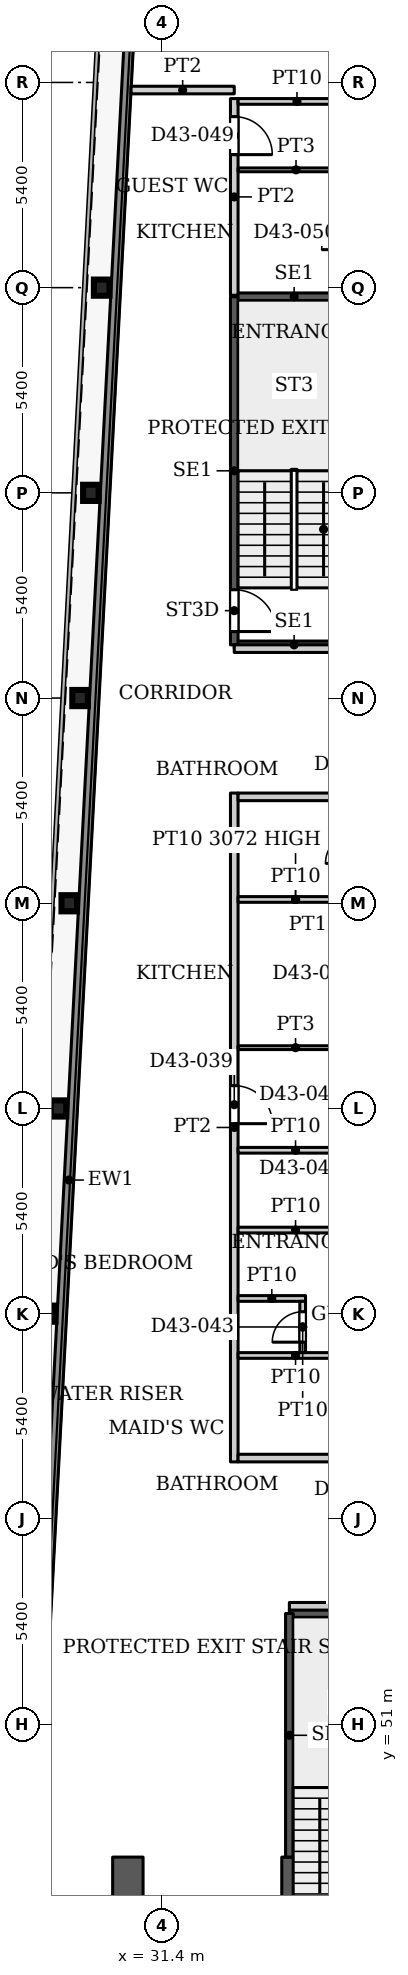
"""IFC4 building model, lengths in metres.
Left out: names, types, materials, properties, quantities, classifications, styles, units other than length and angle.
Written with IfcOpenShell. Run it as: python <this file> out.ifc"""

import sys

from ifc_helpers import new_model, si_unit, direction, frame, frame_2d, origin, origin_2d, place, context, subcontext, project, spatial, rectangle, i_section, extrude, source, transform, mapped, element, fill, save


model = new_model("IFC4")
c1 = context("Model", 3, precision=1e-05, world=origin(), true_north=direction((0.0, 1.0)))
c2 = subcontext(c1, "Body", "Model", "MODEL_VIEW")
j1 = project(units=[si_unit("LENGTHUNIT", "METRE"), si_unit("PLANEANGLEUNIT", "RADIAN")], contexts=[c1])
p1 = place(None, origin())
s1 = spatial("IfcSite", under=j1, at=p1, CompositionType="ELEMENT")
p2 = place(p1, origin())
s2 = spatial("IfcBuilding", under=s1, at=p2, CompositionType="ELEMENT")
p3 = place(p2, frame((0.0, 0.0, 187.7)))
s3 = spatial("IfcBuildingStorey", under=s2, at=p3, CompositionType="ELEMENT", Elevation=187.7)
for number, where, z_axis, x_axis in (
    (1, (28.39, 61.8, 0.0), (0.0, 0.0, 1.0), (1.0, 0.0, 0.0)),
    (2, (28.674, 67.2, 0.0), (0.0, 0.0, 1.0), (1.0, 0.0, 0.0)),
    (3, (28.958, 72.6, 0.0), (0.0, 0.0, 1.0), (1.0, 0.0, 0.0)),
    (4, (29.243, 78.0, 0.0), (0.0, 0.0, 1.0), (1.0, 0.0, 0.0)),
    (5, (29.527, 83.4, 0.0), (0.0, 0.0, 1.0), (1.0, 0.0, 0.0)),
    (6, (29.811, 88.8, 0.0), (0.0, 0.0, 1.0), (1.0, 0.0, 0.0)),
):
    element("IfcColumn", number, at=place(p3, frame(where, z_axis=z_axis, x_axis=x_axis)), inside=s3, PredefinedType="COLUMN", context=c2, shape_type="SweptSolid", body=[
        extrude(i_section(OverallWidth=0.409, OverallDepth=0.425, WebThickness=0.033, FlangeThickness=0.052, FilletRadius=0.013, at=origin_2d()), origin(), (0.0, 0.0, 1.0), 3.9),
    ])
p4 = place(p3, frame((34.75, 29.05, 0.0), z_axis=(0.0, 0.0, 1.0), x_axis=(0.0, 1.0, 0.0)))
e7 = element("IfcWall", 7, at=p4, inside=s3, PredefinedType="SHEAR", context=c2, shape_type="SweptSolid", body=[
    extrude(rectangle(XDim=18.45, YDim=0.4, at=frame_2d((9.225, 0.0))), origin(), (0.0, 0.0, 1.0), 3.9),
])
p5 = place(p4, frame((8.025, 0.0, 0.0)))
e8 = element("IfcOpeningElement", 8, at=p5, cuts=e7, PredefinedType="OPENING", context=c2, shape_type="SweptSolid", body=[
    extrude(rectangle(XDim=1.1, YDim=2.2, at=frame_2d((0.55, 1.1))), frame((0.0, 0.21, 0.0), z_axis=(0.0, -1.0, 0.0), x_axis=(1.0, 0.0, 0.0)), (0.0, 0.0, 1.0), 0.42),
])
p6 = place(p4, frame((10.875, 0.0, 0.0)))
e9 = element("IfcOpeningElement", 9, at=p6, cuts=e7, PredefinedType="OPENING", context=c2, shape_type="SweptSolid", body=[
    extrude(rectangle(XDim=1.1, YDim=2.2, at=frame_2d((0.55, 1.1))), frame((0.0, 0.21, 0.0), z_axis=(0.0, -1.0, 0.0), x_axis=(1.0, 0.0, 0.0)), (0.0, 0.0, 1.0), 0.42),
])
p7 = place(p4, frame((13.725, 0.0, 0.0)))
e10 = element("IfcOpeningElement", 10, at=p7, cuts=e7, PredefinedType="OPENING", context=c2, shape_type="SweptSolid", body=[
    extrude(rectangle(XDim=1.1, YDim=2.2, at=frame_2d((0.55, 1.1))), frame((0.0, 0.21, 0.0), z_axis=(0.0, -1.0, 0.0), x_axis=(1.0, 0.0, 0.0)), (0.0, 0.0, 1.0), 0.42),
])
p8 = place(p4, frame((15.95, 0.0, 0.0)))
e11 = element("IfcOpeningElement", 11, at=p8, cuts=e7, PredefinedType="OPENING", context=c2, shape_type="SweptSolid", body=[
    extrude(rectangle(XDim=1.1, YDim=2.2, at=frame_2d((0.55, 1.1))), frame((0.0, 0.21, 0.0), z_axis=(0.0, -1.0, 0.0), x_axis=(1.0, 0.0, 0.0)), (0.0, 0.0, 1.0), 0.42),
])
p9 = place(p3, frame((30.5, 29.05, 0.0), z_axis=(0.0, 0.0, 1.0), x_axis=(0.0, 1.0, 0.0)))
e12 = element("IfcWall", 12, at=p9, inside=s3, PredefinedType="SHEAR", context=c2, shape_type="SweptSolid", body=[
    extrude(rectangle(XDim=18.45, YDim=0.8, at=frame_2d((9.225, 0.0))), origin(), (0.0, 0.0, 1.0), 3.9),
])
p10 = place(p9, frame((1.5, 0.0, 0.0)))
e13 = element("IfcOpeningElement", 13, at=p10, cuts=e12, PredefinedType="OPENING", context=c2, shape_type="SweptSolid", body=[
    extrude(rectangle(XDim=0.9, YDim=2.2, at=frame_2d((0.45, 1.1))), frame((0.0, 0.41, 0.0), z_axis=(0.0, -1.0, 0.0), x_axis=(1.0, 0.0, 0.0)), (0.0, 0.0, 1.0), 0.82),
])
p11 = place(p9, frame((8.705, 0.0, 0.0)))
e14 = element("IfcOpeningElement", 14, at=p11, cuts=e12, PredefinedType="OPENING", context=c2, shape_type="SweptSolid", body=[
    extrude(rectangle(XDim=0.9, YDim=2.2, at=frame_2d((0.45, 1.1))), frame((0.0, 0.41, 0.0), z_axis=(0.0, -1.0, 0.0), x_axis=(1.0, 0.0, 0.0)), (0.0, 0.0, 1.0), 0.82),
])
p12 = place(p3, frame((27.195, 31.969, 0.0), z_axis=(0.0, 0.0, 1.0), x_axis=(0.052554995867, 0.998618031286, 0.0)))
e15 = element("IfcWall", 15, at=p12, inside=s3, PredefinedType="SOLIDWALL", context=c2, shape_type="SweptSolid", body=[
    extrude(rectangle(XDim=66.787, YDim=0.25, at=frame_2d((33.394, 0.0))), origin(), (0.0, 0.0, 1.0), 3.75),
])
p13 = place(p3, frame((34.75, 53.91, 0.0), z_axis=(0.0, 0.0, 1.0), x_axis=(1.0, 0.0, 0.0)))
e16 = element("IfcWall", 16, at=p13, inside=s3, PredefinedType="SHEAR", context=c2, shape_type="SweptSolid", body=[
    extrude(rectangle(XDim=3.15, YDim=0.2, at=frame_2d((1.575, 0.0))), origin(), (0.0, 0.0, 1.0), 3.9),
])
p14 = place(p3, frame((34.75, 47.5, 0.0), z_axis=(0.0, 0.0, 1.0), x_axis=(0.0, 1.0, 0.0)))
e17 = element("IfcWall", 17, at=p14, inside=s3, PredefinedType="SHEAR", context=c2, shape_type="SweptSolid", body=[
    extrude(rectangle(XDim=6.41, YDim=0.2, at=frame_2d((3.205, 0.0))), origin(), (0.0, 0.0, 1.0), 3.9),
])
for number, where, z_axis, x_axis in (
    (18, (33.3, 79.4, 0.0), (0.0, 0.0, 1.0), (1.0, 0.0, 0.0)),
    (19, (33.3, 88.56, 0.0), (0.0, 0.0, 1.0), (1.0, 0.0, 0.0)),
):
    element("IfcWall", number, at=place(p3, frame(where, z_axis=z_axis, x_axis=x_axis)), inside=s3, PredefinedType="SHEAR", context=c2, shape_type="SweptSolid", body=[
        extrude(rectangle(XDim=3.15, YDim=0.2, at=frame_2d((1.575, 0.0))), origin(), (0.0, 0.0, 1.0), 3.9),
    ])
p15 = place(p3, frame((33.3, 79.4, 0.0), z_axis=(0.0, 0.0, 1.0), x_axis=(0.0, 1.0, 0.0)))
e20 = element("IfcWall", 20, at=p15, inside=s3, PredefinedType="SHEAR", context=c2, shape_type="SweptSolid", body=[
    extrude(rectangle(XDim=9.16, YDim=0.2, at=frame_2d((4.58, 0.0))), origin(), (0.0, 0.0, 1.0), 3.9),
])
p16 = place(p15, frame((0.35, 0.0, 0.0)))
e21 = element("IfcOpeningElement", 21, at=p16, cuts=e20, PredefinedType="OPENING", context=c2, shape_type="SweptSolid", body=[
    extrude(rectangle(XDim=1.1, YDim=2.2, at=frame_2d((0.55, 1.1))), frame((0.0, 0.11, 0.0), z_axis=(0.0, -1.0, 0.0), x_axis=(1.0, 0.0, 0.0)), (0.0, 0.0, 1.0), 0.22),
])
p17 = place(p3, frame((30.585, 94.0, 0.0), z_axis=(0.0, 0.0, 1.0), x_axis=(1.0, 0.0, 0.0)))
e22 = element("IfcWall", 22, at=p17, inside=s3, PredefinedType="PARTITIONING", context=c2, shape_type="SweptSolid", body=[
    extrude(rectangle(XDim=2.715, YDim=0.2, at=frame_2d((1.358, 0.0))), origin(), (0.0, 0.0, 1.0), 3.6),
])
p18 = place(p3, frame((33.3, 57.9, 0.0), z_axis=(0.0, 0.0, 1.0), x_axis=(0.0, 1.0, 0.0)))
e23 = element("IfcWall", 23, at=p18, inside=s3, PredefinedType="PARTITIONING", context=c2, shape_type="SweptSolid", body=[
    extrude(rectangle(XDim=17.6, YDim=0.2, at=frame_2d((8.8, 0.0))), origin(), (0.0, 0.0, 1.0), 3.6),
])
p19 = place(p18, frame((8.9, 0.0, 0.0)))
e24 = element("IfcOpeningElement", 24, at=p19, cuts=e23, PredefinedType="OPENING", context=c2, shape_type="SweptSolid", body=[
    extrude(rectangle(XDim=1.0, YDim=2.1, at=frame_2d((0.5, 1.05))), frame((0.0, 0.11, 0.0), z_axis=(0.0, -1.0, 0.0), x_axis=(1.0, 0.0, 0.0)), (0.0, 0.0, 1.0), 0.22),
])
p20 = place(p3, frame((33.3, 79.3, 0.0), z_axis=(0.0, 0.0, 1.0), x_axis=(1.0, 0.0, 0.0)))
e25 = element("IfcWall", 25, at=p20, inside=s3, PredefinedType="PARTITIONING", context=c2, shape_type="SweptSolid", body=[
    extrude(rectangle(XDim=12.6, YDim=0.2, at=frame_2d((6.3, 0.0))), origin(), (0.0, 0.0, 1.0), 3.6),
])
p21 = place(p20, frame((5.795, 0.0, 0.0)))
e26 = element("IfcOpeningElement", 26, at=p21, cuts=e25, PredefinedType="OPENING", context=c2, shape_type="SweptSolid", body=[
    extrude(rectangle(XDim=1.0, YDim=2.1, at=frame_2d((0.5, 1.05))), frame((0.0, 0.11, 0.0), z_axis=(0.0, -1.0, 0.0), x_axis=(1.0, 0.0, 0.0)), (0.0, 0.0, 1.0), 0.22),
])
p22 = place(p3, frame((33.3, 88.6, 0.0), z_axis=(0.0, 0.0, 1.0), x_axis=(0.0, 1.0, 0.0)))
e27 = element("IfcWall", 27, at=p22, inside=s3, PredefinedType="PARTITIONING", context=c2, shape_type="SweptSolid", body=[
    extrude(rectangle(XDim=5.175, YDim=0.2, at=frame_2d((2.587, 0.0))), origin(), (0.0, 0.0, 1.0), 3.6),
])
p23 = place(p22, frame((3.7, 0.0, 0.0)))
e28 = element("IfcOpeningElement", 28, at=p23, cuts=e27, PredefinedType="OPENING", context=c2, shape_type="SweptSolid", body=[
    extrude(rectangle(XDim=1.0, YDim=2.1, at=frame_2d((0.5, 1.05))), frame((0.0, 0.11, 0.0), z_axis=(0.0, -1.0, 0.0), x_axis=(1.0, 0.0, 0.0)), (0.0, 0.0, 1.0), 0.22),
])
p24 = place(p3, frame((33.4, 58.0, 0.0), z_axis=(0.0, 0.0, 1.0), x_axis=(1.0, 0.0, 0.0)))
e29 = element("IfcWall", 29, at=p24, inside=s3, PredefinedType="PARTITIONING", context=c2, shape_type="SweptSolid", body=[
    extrude(rectangle(XDim=12.5, YDim=0.2, at=frame_2d((6.25, 0.0))), origin(), (0.0, 0.0, 1.0), 3.6),
])
p25 = place(p3, frame((33.4, 60.7, 0.0), z_axis=(0.0, 0.0, 1.0), x_axis=(1.0, 0.0, 0.0)))
e30 = element("IfcWall", 30, at=p25, inside=s3, PredefinedType="PARTITIONING", context=c2, shape_type="SweptSolid", body=[
    extrude(rectangle(XDim=3.025, YDim=0.15, at=frame_2d((1.513, 0.0))), origin(), (0.0, 0.0, 1.0), 3.6),
])
p26 = place(p3, frame((33.4, 62.2, 0.0), z_axis=(0.0, 0.0, 1.0), x_axis=(1.0, 0.0, 0.0)))
e31 = element("IfcWall", 31, at=p26, inside=s3, PredefinedType="PARTITIONING", context=c2, shape_type="SweptSolid", body=[
    extrude(rectangle(XDim=1.775, YDim=0.15, at=frame_2d((0.888, 0.0))), origin(), (0.0, 0.0, 1.0), 3.6),
])
for number, where, z_axis, x_axis in (
    (32, (33.4, 64.0, 0.0), (0.0, 0.0, 1.0), (1.0, 0.0, 0.0)),
    (33, (33.4, 66.1, 0.0), (0.0, 0.0, 1.0), (1.0, 0.0, 0.0)),
):
    element("IfcWall", number, at=place(p3, frame(where, z_axis=z_axis, x_axis=x_axis)), inside=s3, PredefinedType="PARTITIONING", context=c2, shape_type="SweptSolid", body=[
        extrude(rectangle(XDim=3.025, YDim=0.15, at=frame_2d((1.513, 0.0))), origin(), (0.0, 0.0, 1.0), 3.6),
    ])
p27 = place(p3, frame((33.4, 68.8, 0.0), z_axis=(0.0, 0.0, 1.0), x_axis=(1.0, 0.0, 0.0)))
e34 = element("IfcWall", 34, at=p27, inside=s3, PredefinedType="PARTITIONING", context=c2, shape_type="SweptSolid", body=[
    extrude(rectangle(XDim=3.025, YDim=0.1, at=frame_2d((1.513, 0.0))), origin(), (0.0, 0.0, 1.0), 3.6),
])
p28 = place(p3, frame((33.4, 72.7, 0.0), z_axis=(0.0, 0.0, 1.0), x_axis=(1.0, 0.0, 0.0)))
e35 = element("IfcWall", 35, at=p28, inside=s3, PredefinedType="PARTITIONING", context=c2, shape_type="SweptSolid", body=[
    extrude(rectangle(XDim=3.025, YDim=0.15, at=frame_2d((1.513, 0.0))), origin(), (0.0, 0.0, 1.0), 3.072),
])
p29 = place(p3, frame((33.4, 75.4, 0.0), z_axis=(0.0, 0.0, 1.0), x_axis=(1.0, 0.0, 0.0)))
e36 = element("IfcWall", 36, at=p29, inside=s3, PredefinedType="PARTITIONING", context=c2, shape_type="SweptSolid", body=[
    extrude(rectangle(XDim=12.5, YDim=0.2, at=frame_2d((6.25, 0.0))), origin(), (0.0, 0.0, 1.0), 3.6),
])
p30 = place(p3, frame((33.4, 91.9, 0.0), z_axis=(0.0, 0.0, 1.0), x_axis=(1.0, 0.0, 0.0)))
e37 = element("IfcWall", 37, at=p30, inside=s3, PredefinedType="PARTITIONING", context=c2, shape_type="SweptSolid", body=[
    extrude(rectangle(XDim=3.05, YDim=0.1, at=frame_2d((1.525, 0.0))), origin(), (0.0, 0.0, 1.0), 3.6),
])
p31 = place(p3, frame((33.4, 93.7, 0.0), z_axis=(0.0, 0.0, 1.0), x_axis=(1.0, 0.0, 0.0)))
e38 = element("IfcWall", 38, at=p31, inside=s3, PredefinedType="PARTITIONING", context=c2, shape_type="SweptSolid", body=[
    extrude(rectangle(XDim=3.1, YDim=0.15, at=frame_2d((1.55, 0.0))), origin(), (0.0, 0.0, 1.0), 3.6),
])
p32 = place(p3, frame((34.75, 54.1, 0.0), z_axis=(0.0, 0.0, 1.0), x_axis=(1.0, 0.0, 0.0)))
e39 = element("IfcWall", 39, at=p32, inside=s3, PredefinedType="PARTITIONING", context=c2, shape_type="SweptSolid", body=[
    extrude(rectangle(XDim=11.15, YDim=0.2, at=frame_2d((5.575, 0.0))), origin(), (0.0, 0.0, 1.0), 3.6),
])
p33 = place(p32, frame((5.075, 0.0, 0.0)))
e40 = element("IfcOpeningElement", 40, at=p33, cuts=e39, PredefinedType="OPENING", context=c2, shape_type="SweptSolid", body=[
    extrude(rectangle(XDim=1.0, YDim=2.1, at=frame_2d((0.5, 1.05))), frame((0.0, 0.11, 0.0), z_axis=(0.0, -1.0, 0.0), x_axis=(1.0, 0.0, 0.0)), (0.0, 0.0, 1.0), 0.22),
])
p34 = place(p3, frame((35.1, 60.775, 0.0), z_axis=(0.0, 0.0, 1.0), x_axis=(0.0, 1.0, 0.0)))
e41 = element("IfcWall", 41, at=p34, inside=s3, PredefinedType="PARTITIONING", context=c2, shape_type="SweptSolid", body=[
    extrude(rectangle(XDim=1.35, YDim=0.15, at=frame_2d((0.675, 0.0))), origin(), (0.0, 0.0, 1.0), 3.6),
])
p35 = place(p34, frame((0.275, 0.0, 0.0)))
e42 = element("IfcOpeningElement", 42, at=p35, cuts=e41, PredefinedType="OPENING", context=c2, shape_type="SweptSolid", body=[
    extrude(rectangle(XDim=0.8, YDim=2.1, at=frame_2d((0.4, 1.05))), frame((0.0, 0.085, 0.0), z_axis=(0.0, -1.0, 0.0), x_axis=(1.0, 0.0, 0.0)), (0.0, 0.0, 1.0), 0.17),
])
m1 = source(origin(), c2, "Body", "SweptSolid", [
    extrude(rectangle(XDim=1.1, YDim=2.2, at=frame_2d((0.55, 1.1))), frame((0.0, 0.025, 0.0), z_axis=(0.0, -1.0, 0.0), x_axis=(1.0, 0.0, 0.0)), (0.0, 0.0, 1.0), 0.05),
])
p36 = place(p16, origin())
e43 = element("IfcDoor", 43, at=p36, inside=s3, OperationType="SINGLE_SWING_RIGHT", PredefinedType="DOOR", context=c2, shape_type="MappedRepresentation", body=[
    mapped(m1, transform((0.0, 0.0, 0.0), x_axis=(1.0, 0.0, 0.0), y_axis=(0.0, 1.0, 0.0), z_axis=(0.0, 0.0, 1.0), scale=1.0)),
])
fill(e21, e43)
m2 = source(origin(), c2, "Body", "SweptSolid", [
    extrude(rectangle(XDim=1.0, YDim=2.1, at=frame_2d((0.5, 1.05))), frame((0.0, 0.025, 0.0), z_axis=(0.0, -1.0, 0.0), x_axis=(1.0, 0.0, 0.0)), (0.0, 0.0, 1.0), 0.05),
])
p37 = place(p19, origin())
e44 = element("IfcDoor", 44, at=p37, inside=s3, OperationType="SINGLE_SWING_RIGHT", PredefinedType="DOOR", context=c2, shape_type="MappedRepresentation", body=[
    mapped(m2, transform((0.0, 0.0, 0.0), x_axis=(1.0, 0.0, 0.0), y_axis=(0.0, 1.0, 0.0), z_axis=(0.0, 0.0, 1.0), scale=1.0)),
])
fill(e24, e44)
m3 = source(origin(), c2, "Body", "SweptSolid", [
    extrude(rectangle(XDim=0.8, YDim=2.1, at=frame_2d((0.4, 1.05))), frame((0.0, 0.025, 0.0), z_axis=(0.0, -1.0, 0.0), x_axis=(1.0, 0.0, 0.0)), (0.0, 0.0, 1.0), 0.05),
])
p38 = place(p35, origin())
e45 = element("IfcDoor", 45, at=p38, inside=s3, OperationType="SINGLE_SWING_LEFT", PredefinedType="DOOR", context=c2, shape_type="MappedRepresentation", body=[
    mapped(m3, transform((0.0, 0.0, 0.0), x_axis=(1.0, 0.0, 0.0), y_axis=(0.0, 1.0, 0.0), z_axis=(0.0, 0.0, 1.0), scale=1.0)),
])
fill(e42, e45)
p39 = place(p23, origin())
e46 = element("IfcDoor", 46, at=p39, inside=s3, OperationType="SINGLE_SWING_RIGHT", PredefinedType="DOOR", context=c2, shape_type="MappedRepresentation", body=[
    mapped(m2, transform((0.0, 0.0, 0.0), x_axis=(1.0, 0.0, 0.0), y_axis=(0.0, 1.0, 0.0), z_axis=(0.0, 0.0, 1.0), scale=1.0)),
])
fill(e28, e46)
save(model, sys.argv[1])
